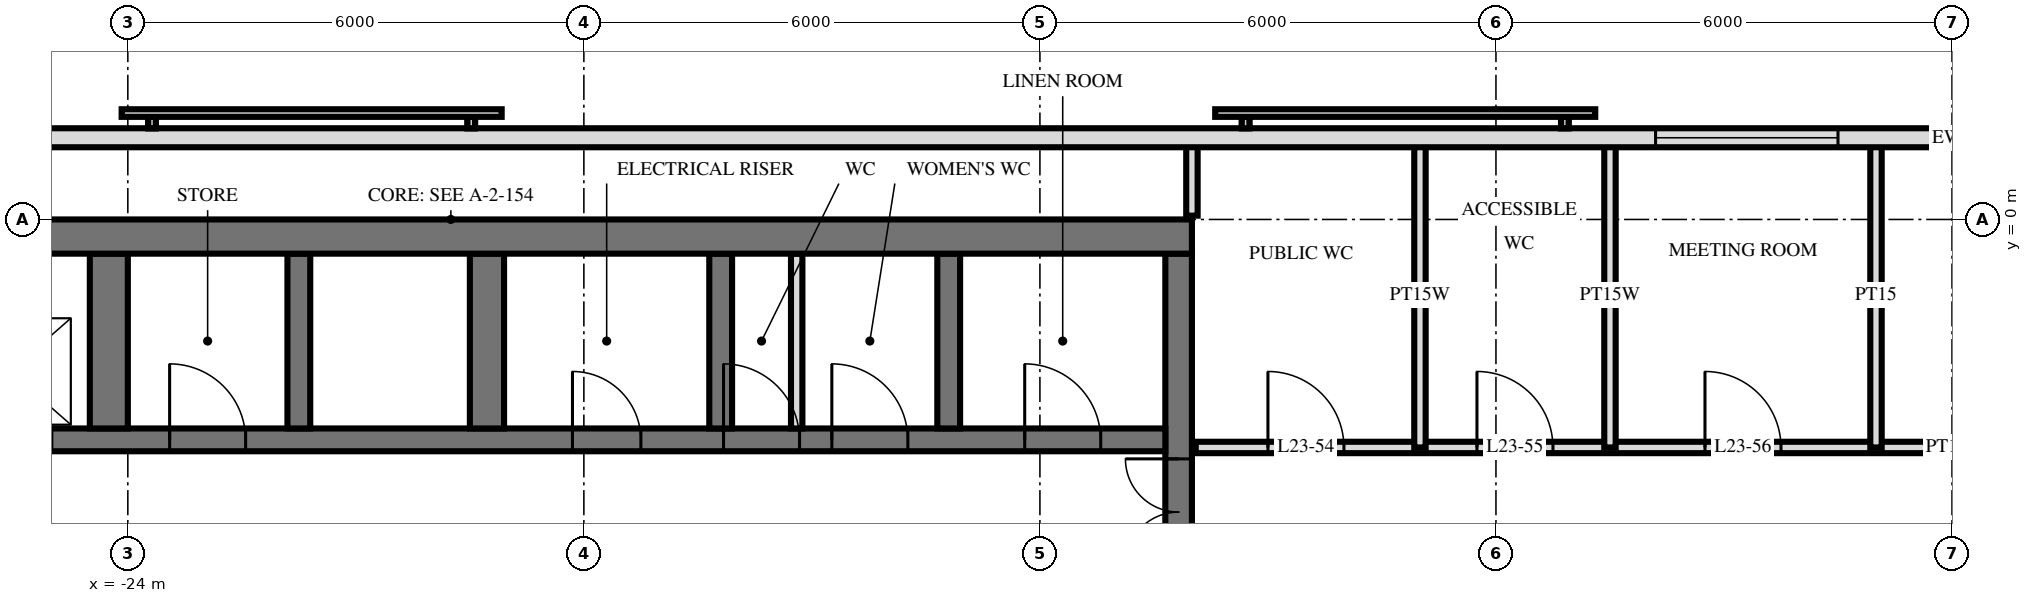
"""IFC4 building model, lengths in metres.
Left out: names, types, materials, properties, quantities, classifications, styles, units other than length and angle.
Written with IfcOpenShell. Run it as: python <this file> out.ifc"""

import sys

from ifc_helpers import new_model, si_unit, direction, frame, frame_2d, origin, place, context, subcontext, project, spatial, rectangle, extrude, element, fill, save


model = new_model("IFC4")
c1 = context("Model", 3, precision=1e-05, world=origin(), true_north=direction((0.0, 1.0)))
c2 = subcontext(c1, "Body", "Model", "MODEL_VIEW")
j1 = project(units=[si_unit("LENGTHUNIT", "METRE"), si_unit("PLANEANGLEUNIT", "RADIAN")], contexts=[c1])
p1 = place(None, origin())
s1 = spatial("IfcSite", under=j1, at=p1, CompositionType="ELEMENT")
p2 = place(p1, origin())
s2 = spatial("IfcBuilding", under=s1, at=p2, CompositionType="ELEMENT")
p3 = place(p2, frame((0.0, 0.0, 92.4)))
s3 = spatial("IfcBuildingStorey", under=s2, at=p3, CompositionType="ELEMENT", Elevation=92.4)
p4 = place(p3, frame((-29.5, -0.225, 0.0), z_axis=(0.0, 0.0, 1.0), x_axis=(1.0, 0.0, 0.0)))
e1 = element("IfcWall", 1, at=p4, inside=s3, PredefinedType="SHEAR", context=c2, shape_type="SweptSolid", body=[
    extrude(rectangle(XDim=19.5, YDim=0.45, at=frame_2d((9.75, 0.0))), origin(), (0.0, 0.0, 1.0), 3.6),
])
p5 = place(p3, frame((-10.175, -14.55, 0.0), z_axis=(0.0, 0.0, 1.0), x_axis=(0.0, 1.0, 0.0)))
e2 = element("IfcWall", 2, at=p5, inside=s3, PredefinedType="SHEAR", context=c2, shape_type="SweptSolid", body=[
    extrude(rectangle(XDim=14.1, YDim=0.35, at=frame_2d((7.05, 0.0))), origin(), (0.0, 0.0, 1.0), 3.6),
])
p6 = place(p5, frame((8.4, 0.0, 0.0)))
e3 = element("IfcOpeningElement", 3, at=p6, cuts=e2, PredefinedType="OPENING", context=c2, shape_type="SweptSolid", body=[
    extrude(rectangle(XDim=1.4, YDim=2.4, at=frame_2d((0.7, 1.2))), frame((0.0, 0.185, 0.0), z_axis=(0.0, -1.0, 0.0), x_axis=(1.0, 0.0, 0.0)), (0.0, 0.0, 1.0), 0.37),
])
p7 = place(p5, frame((10.0, 0.0, 0.0)))
e4 = element("IfcOpeningElement", 4, at=p7, cuts=e2, PredefinedType="OPENING", context=c2, shape_type="SweptSolid", body=[
    extrude(rectangle(XDim=1.4, YDim=2.4, at=frame_2d((0.7, 1.2))), frame((0.0, 0.185, 0.0), z_axis=(0.0, -1.0, 0.0), x_axis=(1.0, 0.0, 0.0)), (0.0, 0.0, 1.0), 0.37),
])
p8 = place(p5, frame((4.0, 0.0, 0.0)))
e5 = element("IfcOpeningElement", 5, at=p8, cuts=e2, PredefinedType="OPENING", context=c2, shape_type="SweptSolid", body=[
    extrude(rectangle(XDim=1.2, YDim=2.1, at=frame_2d((0.6, 1.05))), frame((0.0, 0.185, 0.0), z_axis=(0.0, -1.0, 0.0), x_axis=(1.0, 0.0, 0.0)), (0.0, 0.0, 1.0), 0.37),
])
p9 = place(p3, frame((-29.05, -2.9, 0.0), z_axis=(0.0, 0.0, 1.0), x_axis=(1.0, 0.0, 0.0)))
e6 = element("IfcWall", 6, at=p9, inside=s3, PredefinedType="SHEAR", context=c2, shape_type="SweptSolid", body=[
    extrude(rectangle(XDim=18.7, YDim=0.3, at=frame_2d((9.35, 0.0))), origin(), (0.0, 0.0, 1.0), 3.6),
])
p10 = place(p9, frame((2.95, 0.0, 0.0)))
e7 = element("IfcOpeningElement", 7, at=p10, cuts=e6, PredefinedType="OPENING", context=c2, shape_type="SweptSolid", body=[
    extrude(rectangle(XDim=1.1, YDim=2.1, at=frame_2d((0.55, 1.05))), frame((0.0, 0.16, 0.0), z_axis=(0.0, -1.0, 0.0), x_axis=(1.0, 0.0, 0.0)), (0.0, 0.0, 1.0), 0.32),
])
p11 = place(p9, frame((0.55, 0.0, 0.0)))
e8 = element("IfcOpeningElement", 8, at=p11, cuts=e6, PredefinedType="OPENING", context=c2, shape_type="SweptSolid", body=[
    extrude(rectangle(XDim=1.1, YDim=2.1, at=frame_2d((0.55, 1.05))), frame((0.0, 0.16, 0.0), z_axis=(0.0, -1.0, 0.0), x_axis=(1.0, 0.0, 0.0)), (0.0, 0.0, 1.0), 0.32),
])
p12 = place(p9, frame((10.9, 0.0, 0.0)))
e9 = element("IfcOpeningElement", 9, at=p12, cuts=e6, PredefinedType="OPENING", context=c2, shape_type="SweptSolid", body=[
    extrude(rectangle(XDim=0.9, YDim=2.1, at=frame_2d((0.45, 1.05))), frame((0.0, 0.16, 0.0), z_axis=(0.0, -1.0, 0.0), x_axis=(1.0, 0.0, 0.0)), (0.0, 0.0, 1.0), 0.32),
])
p13 = place(p9, frame((16.85, 0.0, 0.0)))
e10 = element("IfcOpeningElement", 10, at=p13, cuts=e6, PredefinedType="OPENING", context=c2, shape_type="SweptSolid", body=[
    extrude(rectangle(XDim=1.0, YDim=2.1, at=frame_2d((0.5, 1.05))), frame((0.0, 0.16, 0.0), z_axis=(0.0, -1.0, 0.0), x_axis=(1.0, 0.0, 0.0)), (0.0, 0.0, 1.0), 0.32),
])
p14 = place(p9, frame((14.312, 0.0, 0.0)))
e11 = element("IfcOpeningElement", 11, at=p14, cuts=e6, PredefinedType="OPENING", context=c2, shape_type="SweptSolid", body=[
    extrude(rectangle(XDim=1.0, YDim=2.1, at=frame_2d((0.5, 1.05))), frame((0.0, 0.16, 0.0), z_axis=(0.0, -1.0, 0.0), x_axis=(1.0, 0.0, 0.0)), (0.0, 0.0, 1.0), 0.32),
])
p15 = place(p9, frame((12.887, 0.0, 0.0)))
e12 = element("IfcOpeningElement", 12, at=p15, cuts=e6, PredefinedType="OPENING", context=c2, shape_type="SweptSolid", body=[
    extrude(rectangle(XDim=1.0, YDim=2.1, at=frame_2d((0.5, 1.05))), frame((0.0, 0.16, 0.0), z_axis=(0.0, -1.0, 0.0), x_axis=(1.0, 0.0, 0.0)), (0.0, 0.0, 1.0), 0.32),
])
p16 = place(p9, frame((5.6, 0.0, 0.0)))
e13 = element("IfcOpeningElement", 13, at=p16, cuts=e6, PredefinedType="OPENING", context=c2, shape_type="SweptSolid", body=[
    extrude(rectangle(XDim=1.0, YDim=2.1, at=frame_2d((0.5, 1.05))), frame((0.0, 0.16, 0.0), z_axis=(0.0, -1.0, 0.0), x_axis=(1.0, 0.0, 0.0)), (0.0, 0.0, 1.0), 0.32),
])
for number, where, z_axis, x_axis in (
    (14, (-13.2, -2.75, 0.0), (0.0, 0.0, 1.0), (0.0, 1.0, 0.0)),
    (15, (-16.2, -2.75, 0.0), (0.0, 0.0, 1.0), (0.0, 1.0, 0.0)),
):
    element("IfcWall", number, at=place(p3, frame(where, z_axis=z_axis, x_axis=x_axis)), inside=s3, PredefinedType="SHEAR", context=c2, shape_type="SweptSolid", body=[
        extrude(rectangle(XDim=2.3, YDim=0.3, at=frame_2d((1.15, 0.0))), origin(), (0.0, 0.0, 1.0), 3.6),
    ])
p17 = place(p3, frame((-19.275, -2.75, 0.0), z_axis=(0.0, 0.0, 1.0), x_axis=(0.0, 1.0, 0.0)))
e16 = element("IfcWall", 16, at=p17, inside=s3, PredefinedType="SHEAR", context=c2, shape_type="SweptSolid", body=[
    extrude(rectangle(XDim=2.3, YDim=0.45, at=frame_2d((1.15, 0.0))), origin(), (0.0, 0.0, 1.0), 3.6),
])
p18 = place(p3, frame((-21.75, -2.75, 0.0), z_axis=(0.0, 0.0, 1.0), x_axis=(0.0, 1.0, 0.0)))
e17 = element("IfcWall", 17, at=p18, inside=s3, PredefinedType="SHEAR", context=c2, shape_type="SweptSolid", body=[
    extrude(rectangle(XDim=2.3, YDim=0.3, at=frame_2d((1.15, 0.0))), origin(), (0.0, 0.0, 1.0), 3.6),
])
p19 = place(p3, frame((-24.25, -2.75, 0.0), z_axis=(0.0, 0.0, 1.0), x_axis=(0.0, 1.0, 0.0)))
e18 = element("IfcWall", 18, at=p19, inside=s3, PredefinedType="SHEAR", context=c2, shape_type="SweptSolid", body=[
    extrude(rectangle(XDim=2.3, YDim=0.5, at=frame_2d((1.15, 0.0))), origin(), (0.0, 0.0, 1.0), 3.6),
])
p20 = place(p3, frame((28.775, 1.075, 0.0), z_axis=(0.0, 0.0, 1.0), x_axis=(-1.0, 0.0, 0.0)))
e19 = element("IfcWall", 19, at=p20, inside=s3, PredefinedType="SOLIDWALL", context=c2, shape_type="SweptSolid", body=[
    extrude(rectangle(XDim=57.551, YDim=0.25, at=frame_2d((28.775, 0.0))), origin(), (0.0, 0.0, 1.0), 3.32),
])
p21 = place(p20, frame((21.275, 0.0, 0.3)))
e20 = element("IfcOpeningElement", 20, at=p21, cuts=e19, PredefinedType="OPENING", context=c2, shape_type="SweptSolid", body=[
    extrude(rectangle(XDim=2.4, YDim=2.1, at=frame_2d((1.2, 1.05))), frame((0.0, 0.135, 0.0), z_axis=(0.0, -1.0, 0.0), x_axis=(1.0, 0.0, 0.0)), (0.0, 0.0, 1.0), 0.27),
])
p22 = place(p20, frame((24.275, 0.0, 0.3)))
e21 = element("IfcOpeningElement", 21, at=p22, cuts=e19, PredefinedType="OPENING", context=c2, shape_type="SweptSolid", body=[
    extrude(rectangle(XDim=2.4, YDim=2.1, at=frame_2d((1.2, 1.05))), frame((0.0, 0.135, 0.0), z_axis=(0.0, -1.0, 0.0), x_axis=(1.0, 0.0, 0.0)), (0.0, 0.0, 1.0), 0.27),
])
p23 = place(p20, frame((30.275, 0.0, 0.3)))
e22 = element("IfcOpeningElement", 22, at=p23, cuts=e19, PredefinedType="OPENING", context=c2, shape_type="SweptSolid", body=[
    extrude(rectangle(XDim=2.4, YDim=2.1, at=frame_2d((1.2, 1.05))), frame((0.0, 0.135, 0.0), z_axis=(0.0, -1.0, 0.0), x_axis=(1.0, 0.0, 0.0)), (0.0, 0.0, 1.0), 0.27),
])
p24 = place(p3, frame((-15.2, -2.75, 0.0), z_axis=(0.0, 0.0, 1.0), x_axis=(0.0, 1.0, 0.0)))
e23 = element("IfcWall", 23, at=p24, inside=s3, PredefinedType="PARTITIONING", context=c2, shape_type="SweptSolid", body=[
    extrude(rectangle(XDim=2.3, YDim=0.15, at=frame_2d((1.15, 0.0))), origin(), (0.0, 0.0, 1.0), 3.3),
])
p25 = place(p3, frame((-1.0, -3.0, 0.0), z_axis=(0.0, 0.0, 1.0), x_axis=(0.0, 1.0, 0.0)))
e24 = element("IfcWall", 24, at=p25, inside=s3, PredefinedType="PARTITIONING", context=c2, shape_type="SweptSolid", body=[
    extrude(rectangle(XDim=4.02, YDim=0.15, at=frame_2d((2.01, 0.0))), origin(), (0.0, 0.0, 1.0), 3.32),
])
for number, where, z_axis, x_axis in (
    (25, (-4.5, -3.0, 0.0), (0.0, 0.0, 1.0), (0.0, 1.0, 0.0)),
    (26, (-7.0, -3.0, 0.0), (0.0, 0.0, 1.0), (0.0, 1.0, 0.0)),
):
    element("IfcWall", number, at=place(p3, frame(where, z_axis=z_axis, x_axis=x_axis)), inside=s3, PredefinedType="PLUMBINGWALL", context=c2, shape_type="SweptSolid", body=[
        extrude(rectangle(XDim=4.02, YDim=0.15, at=frame_2d((2.01, 0.0))), origin(), (0.0, 0.0, 1.0), 3.32),
    ])
p26 = place(p3, frame((-10.0, 0.05, 0.0), z_axis=(0.0, 0.0, 1.0), x_axis=(0.0, 1.0, 0.0)))
e27 = element("IfcWall", 27, at=p26, inside=s3, PredefinedType="PLUMBINGWALL", context=c2, shape_type="SweptSolid", body=[
    extrude(rectangle(XDim=0.97, YDim=0.15, at=frame_2d((0.485, 0.0))), origin(), (0.0, 0.0, 1.0), 3.32),
])
p27 = place(p3, frame((-9.95, -3.0, 0.0), z_axis=(0.0, 0.0, 1.0), x_axis=(1.0, 0.0, 0.0)))
e28 = element("IfcWall", 28, at=p27, inside=s3, PredefinedType="PARTITIONING", context=c2, shape_type="SweptSolid", body=[
    extrude(rectangle(XDim=19.9, YDim=0.15, at=frame_2d((9.95, 0.0))), origin(), (0.0, 0.0, 1.0), 3.32),
])
p28 = place(p27, frame((0.95, 0.0, 0.0)))
e29 = element("IfcOpeningElement", 29, at=p28, cuts=e28, PredefinedType="OPENING", context=c2, shape_type="SweptSolid", body=[
    extrude(rectangle(XDim=1.0, YDim=2.1, at=frame_2d((0.5, 1.05))), frame((0.0, 0.085, 0.0), z_axis=(0.0, -1.0, 0.0), x_axis=(1.0, 0.0, 0.0)), (0.0, 0.0, 1.0), 0.17),
])
p29 = place(p27, frame((3.7, 0.0, 0.0)))
e30 = element("IfcOpeningElement", 30, at=p29, cuts=e28, PredefinedType="OPENING", context=c2, shape_type="SweptSolid", body=[
    extrude(rectangle(XDim=1.0, YDim=2.1, at=frame_2d((0.5, 1.05))), frame((0.0, 0.085, 0.0), z_axis=(0.0, -1.0, 0.0), x_axis=(1.0, 0.0, 0.0)), (0.0, 0.0, 1.0), 0.17),
])
p30 = place(p27, frame((6.7, 0.0, 0.0)))
e31 = element("IfcOpeningElement", 31, at=p30, cuts=e28, PredefinedType="OPENING", context=c2, shape_type="SweptSolid", body=[
    extrude(rectangle(XDim=1.0, YDim=2.1, at=frame_2d((0.5, 1.05))), frame((0.0, 0.085, 0.0), z_axis=(0.0, -1.0, 0.0), x_axis=(1.0, 0.0, 0.0)), (0.0, 0.0, 1.0), 0.17),
])
p31 = place(p27, frame((13.95, 0.0, 0.0)))
e32 = element("IfcOpeningElement", 32, at=p31, cuts=e28, PredefinedType="OPENING", context=c2, shape_type="SweptSolid", body=[
    extrude(rectangle(XDim=1.0, YDim=2.1, at=frame_2d((0.5, 1.05))), frame((0.0, 0.085, 0.0), z_axis=(0.0, -1.0, 0.0), x_axis=(1.0, 0.0, 0.0)), (0.0, 0.0, 1.0), 0.17),
])
p32 = place(p23, origin())
e33 = element("IfcWindow", 33, at=p32, inside=s3, PartitioningType="SINGLE_PANEL", PredefinedType="WINDOW", context=c2, shape_type="SweptSolid", body=[
    extrude(rectangle(XDim=2.4, YDim=2.1, at=frame_2d((1.2, 1.05))), frame((0.0, 0.03, 0.0), z_axis=(0.0, -1.0, 0.0), x_axis=(1.0, 0.0, 0.0)), (0.0, 0.0, 1.0), 0.06),
])
fill(e22, e33)
p33 = place(p7, origin())
e34 = element("IfcDoor", 34, at=p33, inside=s3, OperationType="DOUBLE_DOOR_SINGLE_SWING", PredefinedType="DOOR", context=c2, shape_type="SweptSolid", body=[
    extrude(rectangle(XDim=1.4, YDim=2.4, at=frame_2d((0.7, 1.2))), frame((0.0, 0.025, 0.0), z_axis=(0.0, -1.0, 0.0), x_axis=(1.0, 0.0, 0.0)), (0.0, 0.0, 1.0), 0.05),
])
fill(e4, e34)
p34 = place(p12, origin())
e35 = element("IfcDoor", 35, at=p34, inside=s3, OperationType="SINGLE_SWING_RIGHT", PredefinedType="DOOR", context=c2, shape_type="SweptSolid", body=[
    extrude(rectangle(XDim=0.9, YDim=2.1, at=frame_2d((0.45, 1.05))), frame((0.0, 0.025, 0.0), z_axis=(0.0, -1.0, 0.0), x_axis=(1.0, 0.0, 0.0)), (0.0, 0.0, 1.0), 0.05),
])
fill(e9, e35)
p35 = place(p13, origin())
e36 = element("IfcDoor", 36, at=p35, inside=s3, OperationType="SINGLE_SWING_RIGHT", PredefinedType="DOOR", context=c2, shape_type="SweptSolid", body=[
    extrude(rectangle(XDim=1.0, YDim=2.1, at=frame_2d((0.5, 1.05))), frame((0.0, 0.025, 0.0), z_axis=(0.0, -1.0, 0.0), x_axis=(1.0, 0.0, 0.0)), (0.0, 0.0, 1.0), 0.05),
])
fill(e10, e36)
p36 = place(p14, origin())
e37 = element("IfcDoor", 37, at=p36, inside=s3, OperationType="SINGLE_SWING_RIGHT", PredefinedType="DOOR", context=c2, shape_type="SweptSolid", body=[
    extrude(rectangle(XDim=1.0, YDim=2.1, at=frame_2d((0.5, 1.05))), frame((0.0, 0.025, 0.0), z_axis=(0.0, -1.0, 0.0), x_axis=(1.0, 0.0, 0.0)), (0.0, 0.0, 1.0), 0.05),
])
fill(e11, e37)
p37 = place(p15, origin())
e38 = element("IfcDoor", 38, at=p37, inside=s3, OperationType="SINGLE_SWING_RIGHT", PredefinedType="DOOR", context=c2, shape_type="SweptSolid", body=[
    extrude(rectangle(XDim=1.0, YDim=2.1, at=frame_2d((0.5, 1.05))), frame((0.0, 0.025, 0.0), z_axis=(0.0, -1.0, 0.0), x_axis=(1.0, 0.0, 0.0)), (0.0, 0.0, 1.0), 0.05),
])
fill(e12, e38)
p38 = place(p16, origin())
e39 = element("IfcDoor", 39, at=p38, inside=s3, OperationType="SINGLE_SWING_RIGHT", PredefinedType="DOOR", context=c2, shape_type="SweptSolid", body=[
    extrude(rectangle(XDim=1.0, YDim=2.1, at=frame_2d((0.5, 1.05))), frame((0.0, 0.025, 0.0), z_axis=(0.0, -1.0, 0.0), x_axis=(1.0, 0.0, 0.0)), (0.0, 0.0, 1.0), 0.05),
])
fill(e13, e39)
p39 = place(p28, origin())
e40 = element("IfcDoor", 40, at=p39, inside=s3, OperationType="SINGLE_SWING_RIGHT", PredefinedType="DOOR", context=c2, shape_type="SweptSolid", body=[
    extrude(rectangle(XDim=1.0, YDim=2.1, at=frame_2d((0.5, 1.05))), frame((0.0, 0.025, 0.0), z_axis=(0.0, -1.0, 0.0), x_axis=(1.0, 0.0, 0.0)), (0.0, 0.0, 1.0), 0.05),
])
fill(e29, e40)
p40 = place(p29, origin())
e41 = element("IfcDoor", 41, at=p40, inside=s3, OperationType="SINGLE_SWING_RIGHT", PredefinedType="DOOR", context=c2, shape_type="SweptSolid", body=[
    extrude(rectangle(XDim=1.0, YDim=2.1, at=frame_2d((0.5, 1.05))), frame((0.0, 0.025, 0.0), z_axis=(0.0, -1.0, 0.0), x_axis=(1.0, 0.0, 0.0)), (0.0, 0.0, 1.0), 0.05),
])
fill(e30, e41)
p41 = place(p30, origin())
e42 = element("IfcDoor", 42, at=p41, inside=s3, OperationType="SINGLE_SWING_RIGHT", PredefinedType="DOOR", context=c2, shape_type="SweptSolid", body=[
    extrude(rectangle(XDim=1.0, YDim=2.1, at=frame_2d((0.5, 1.05))), frame((0.0, 0.025, 0.0), z_axis=(0.0, -1.0, 0.0), x_axis=(1.0, 0.0, 0.0)), (0.0, 0.0, 1.0), 0.05),
])
fill(e31, e42)
save(model, sys.argv[1])
